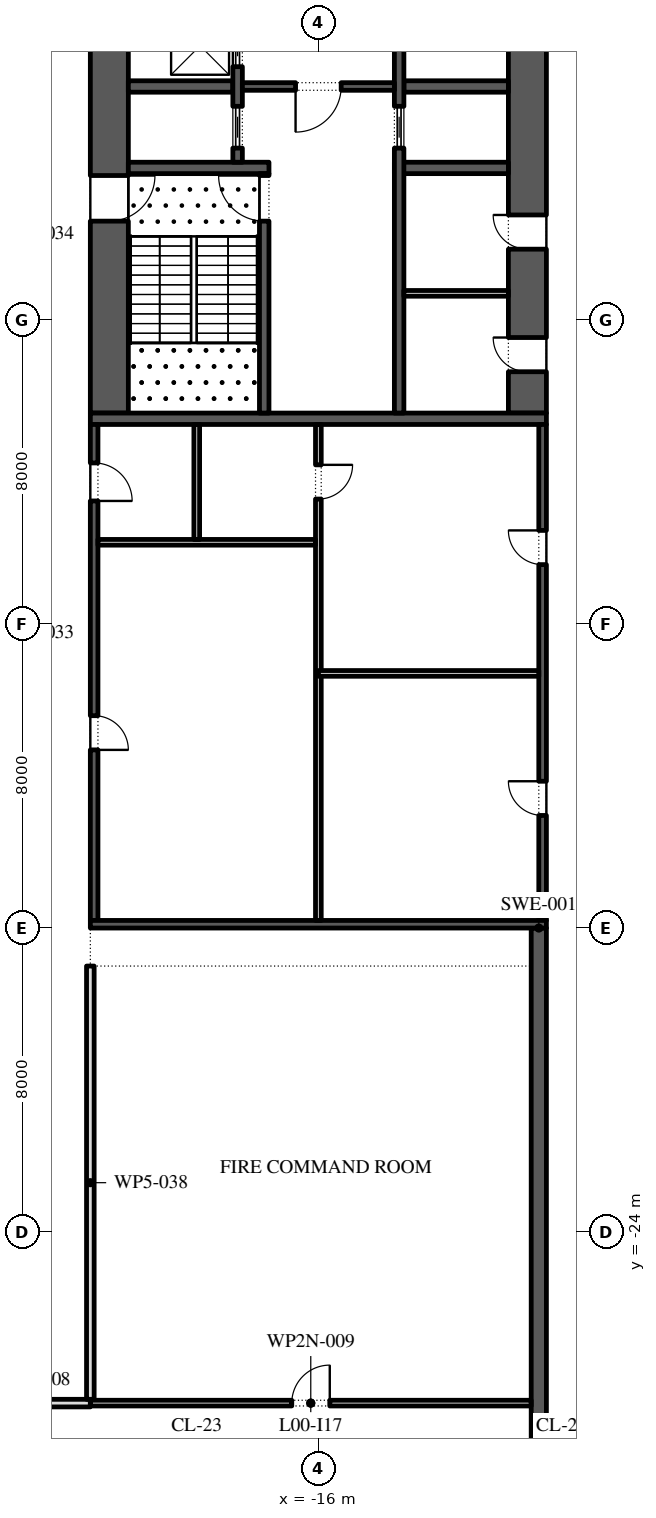
"""IFC4 building model, lengths in metres.
Left out: names, types, materials, properties, quantities, classifications, styles, units other than length and angle.
Written with IfcOpenShell. Run it as: python <this file> out.ifc"""

import sys

from ifc_helpers import new_model, si_unit, direction, frame, frame_2d, origin, place, context, subcontext, project, spatial, rectangle, extrude, element, fill, save


model = new_model("IFC4")
c1 = context("Model", 3, precision=1e-05, world=origin(), true_north=direction((0.0, 1.0)))
c2 = subcontext(c1, "Body", "Model", "MODEL_VIEW")
j1 = project(units=[si_unit("LENGTHUNIT", "METRE"), si_unit("PLANEANGLEUNIT", "RADIAN")], contexts=[c1])
p1 = place(None, origin())
s1 = spatial("IfcSite", under=j1, at=p1, CompositionType="ELEMENT")
p2 = place(p1, origin())
s2 = spatial("IfcBuilding", under=s1, at=p2, CompositionType="ELEMENT")
p3 = place(p2, origin())
s3 = spatial("IfcBuildingStorey", under=s2, at=p3, CompositionType="ELEMENT", Elevation=0.0)
p4 = place(p3, frame((-10.2, -31.0, 0.0), z_axis=(0.0, 0.0, 1.0), x_axis=(0.0, 1.0, 0.0)))
e1 = element("IfcWall", 1, at=p4, inside=s3, PredefinedType="SHEAR", context=c2, shape_type="SweptSolid", body=[
    extrude(rectangle(XDim=15.0, YDim=0.4, at=frame_2d((7.5, 0.0))), origin(), (0.0, 0.0, 1.0), 7.7),
])
p5 = place(p3, frame((-21.5, -2.45, 0.0), z_axis=(0.0, 0.0, 1.0), x_axis=(0.0, 1.0, 0.0)))
e2 = element("IfcWall", 2, at=p5, inside=s3, PredefinedType="SHEAR", context=c2, shape_type="SweptSolid", body=[
    extrude(rectangle(XDim=27.9, YDim=1.0, at=frame_2d((13.95, 0.0))), origin(), (0.0, 0.0, 1.0), 7.7),
])
p6 = place(p5, frame((5.05, 0.0, 0.0)))
e3 = element("IfcOpeningElement", 3, at=p6, cuts=e2, PredefinedType="OPENING", context=c2, shape_type="SweptSolid", body=[
    extrude(rectangle(XDim=1.2, YDim=2.1, at=frame_2d((0.6, 1.05))), frame((0.0, 0.51, 0.0), z_axis=(0.0, -1.0, 0.0), x_axis=(1.0, 0.0, 0.0)), (0.0, 0.0, 1.0), 1.02),
])
p7 = place(p5, frame((21.65, 0.0, 0.0)))
e4 = element("IfcOpeningElement", 4, at=p7, cuts=e2, PredefinedType="OPENING", context=c2, shape_type="SweptSolid", body=[
    extrude(rectangle(XDim=1.2, YDim=2.1, at=frame_2d((0.6, 1.05))), frame((0.0, 0.51, 0.0), z_axis=(0.0, -1.0, 0.0), x_axis=(1.0, 0.0, 0.0)), (0.0, 0.0, 1.0), 1.02),
])
p8 = place(p3, frame((-10.5, -2.45, 0.0), z_axis=(0.0, 0.0, 1.0), x_axis=(0.0, 1.0, 0.0)))
e5 = element("IfcWall", 5, at=p8, inside=s3, PredefinedType="SHEAR", context=c2, shape_type="SweptSolid", body=[
    extrude(rectangle(XDim=27.9, YDim=1.0, at=frame_2d((13.95, 0.0))), origin(), (0.0, 0.0, 1.0), 7.7),
])
p9 = place(p8, frame((23.65, 0.0, 0.0)))
e6 = element("IfcOpeningElement", 6, at=p9, cuts=e5, PredefinedType="OPENING", context=c2, shape_type="SweptSolid", body=[
    extrude(rectangle(XDim=2.4, YDim=2.1, at=frame_2d((1.2, 1.05))), frame((0.0, 0.51, 0.0), z_axis=(0.0, -1.0, 0.0), x_axis=(1.0, 0.0, 0.0)), (0.0, 0.0, 1.0), 1.02),
])
p10 = place(p8, frame((1.087, 0.0, 0.0)))
e7 = element("IfcOpeningElement", 7, at=p10, cuts=e5, PredefinedType="OPENING", context=c2, shape_type="SweptSolid", body=[
    extrude(rectangle(XDim=0.9, YDim=2.1, at=frame_2d((0.45, 1.05))), frame((0.0, 0.51, 0.0), z_axis=(0.0, -1.0, 0.0), x_axis=(1.0, 0.0, 0.0)), (0.0, 0.0, 1.0), 1.02),
])
p11 = place(p8, frame((4.312, 0.0, 0.0)))
e8 = element("IfcOpeningElement", 8, at=p11, cuts=e5, PredefinedType="OPENING", context=c2, shape_type="SweptSolid", body=[
    extrude(rectangle(XDim=0.9, YDim=2.1, at=frame_2d((0.45, 1.05))), frame((0.0, 0.51, 0.0), z_axis=(0.0, -1.0, 0.0), x_axis=(1.0, 0.0, 0.0)), (0.0, 0.0, 1.0), 1.02),
])
p12 = place(p3, frame((-22.0, -2.6, 0.0), z_axis=(0.0, 0.0, 1.0), x_axis=(1.0, 0.0, 0.0)))
e9 = element("IfcWall", 9, at=p12, inside=s3, PredefinedType="SHEAR", context=c2, shape_type="SweptSolid", body=[
    extrude(rectangle(XDim=12.0, YDim=0.3, at=frame_2d((6.0, 0.0))), origin(), (0.0, 0.0, 1.0), 7.7),
])
p13 = place(p3, frame((-21.0, 4.0, 0.0), z_axis=(0.0, 0.0, 1.0), x_axis=(1.0, 0.0, 0.0)))
e10 = element("IfcWall", 10, at=p13, inside=s3, PredefinedType="SHEAR", context=c2, shape_type="SweptSolid", body=[
    extrude(rectangle(XDim=3.7, YDim=0.3, at=frame_2d((1.85, 0.0))), origin(), (0.0, 0.0, 1.0), 7.7),
])
p14 = place(p3, frame((-17.425, -2.45, 0.0), z_axis=(0.0, 0.0, 1.0), x_axis=(0.0, 1.0, 0.0)))
e11 = element("IfcWall", 11, at=p14, inside=s3, PredefinedType="SHEAR", context=c2, shape_type="SweptSolid", body=[
    extrude(rectangle(XDim=6.3, YDim=0.25, at=frame_2d((3.15, 0.0))), origin(), (0.0, 0.0, 1.0), 7.7),
])
p15 = place(p14, frame((5.05, 0.0, 0.0)))
e12 = element("IfcOpeningElement", 12, at=p15, cuts=e11, PredefinedType="OPENING", context=c2, shape_type="SweptSolid", body=[
    extrude(rectangle(XDim=1.2, YDim=2.1, at=frame_2d((0.6, 1.05))), frame((0.0, 0.135, 0.0), z_axis=(0.0, -1.0, 0.0), x_axis=(1.0, 0.0, 0.0)), (0.0, 0.0, 1.0), 0.27),
])
p16 = place(p3, frame((-21.0, 6.143, 0.0), z_axis=(0.0, 0.0, 1.0), x_axis=(1.0, 0.0, 0.0)))
e13 = element("IfcWall", 13, at=p16, inside=s3, PredefinedType="SHEAR", context=c2, shape_type="SweptSolid", body=[
    extrude(rectangle(XDim=2.75, YDim=0.3, at=frame_2d((1.375, 0.0))), origin(), (0.0, 0.0, 1.0), 7.7),
])
p17 = place(p3, frame((-18.125, 4.15, 0.0), z_axis=(0.0, 0.0, 1.0), x_axis=(0.0, 1.0, 0.0)))
e14 = element("IfcWall", 14, at=p17, inside=s3, PredefinedType="SHEAR", context=c2, shape_type="SweptSolid", body=[
    extrude(rectangle(XDim=14.7, YDim=0.25, at=frame_2d((7.35, 0.0))), origin(), (0.0, 0.0, 1.0), 7.7),
])
p18 = place(p17, frame((0.371, 0.0, 0.0)))
e15 = element("IfcOpeningElement", 15, at=p18, cuts=e14, PredefinedType="OPENING", context=c2, shape_type="SweptSolid", body=[
    extrude(rectangle(XDim=1.1, YDim=2.1, at=frame_2d((0.55, 1.05))), frame((0.0, 0.135, 0.0), z_axis=(0.0, -1.0, 0.0), x_axis=(1.0, 0.0, 0.0)), (0.0, 0.0, 1.0), 0.27),
])
p19 = place(p17, frame((2.514, 0.0, 0.0)))
e16 = element("IfcOpeningElement", 16, at=p19, cuts=e14, PredefinedType="OPENING", context=c2, shape_type="SweptSolid", body=[
    extrude(rectangle(XDim=1.1, YDim=2.1, at=frame_2d((0.55, 1.05))), frame((0.0, 0.135, 0.0), z_axis=(0.0, -1.0, 0.0), x_axis=(1.0, 0.0, 0.0)), (0.0, 0.0, 1.0), 0.27),
])
p20 = place(p17, frame((4.657, 0.0, 0.0)))
e17 = element("IfcOpeningElement", 17, at=p20, cuts=e14, PredefinedType="OPENING", context=c2, shape_type="SweptSolid", body=[
    extrude(rectangle(XDim=1.1, YDim=2.1, at=frame_2d((0.55, 1.05))), frame((0.0, 0.135, 0.0), z_axis=(0.0, -1.0, 0.0), x_axis=(1.0, 0.0, 0.0)), (0.0, 0.0, 1.0), 0.27),
])
p21 = place(p17, frame((6.8, 0.0, 0.0)))
e18 = element("IfcOpeningElement", 18, at=p21, cuts=e14, PredefinedType="OPENING", context=c2, shape_type="SweptSolid", body=[
    extrude(rectangle(XDim=1.1, YDim=2.1, at=frame_2d((0.55, 1.05))), frame((0.0, 0.135, 0.0), z_axis=(0.0, -1.0, 0.0), x_axis=(1.0, 0.0, 0.0)), (0.0, 0.0, 1.0), 0.27),
])
p22 = place(p17, frame((8.943, 0.0, 0.0)))
e19 = element("IfcOpeningElement", 19, at=p22, cuts=e14, PredefinedType="OPENING", context=c2, shape_type="SweptSolid", body=[
    extrude(rectangle(XDim=1.1, YDim=2.1, at=frame_2d((0.55, 1.05))), frame((0.0, 0.135, 0.0), z_axis=(0.0, -1.0, 0.0), x_axis=(1.0, 0.0, 0.0)), (0.0, 0.0, 1.0), 0.27),
])
p23 = place(p17, frame((11.086, 0.0, 0.0)))
e20 = element("IfcOpeningElement", 20, at=p23, cuts=e14, PredefinedType="OPENING", context=c2, shape_type="SweptSolid", body=[
    extrude(rectangle(XDim=1.1, YDim=2.1, at=frame_2d((0.55, 1.05))), frame((0.0, 0.135, 0.0), z_axis=(0.0, -1.0, 0.0), x_axis=(1.0, 0.0, 0.0)), (0.0, 0.0, 1.0), 0.27),
])
p24 = place(p17, frame((13.229, 0.0, 0.0)))
e21 = element("IfcOpeningElement", 21, at=p24, cuts=e14, PredefinedType="OPENING", context=c2, shape_type="SweptSolid", body=[
    extrude(rectangle(XDim=1.1, YDim=2.1, at=frame_2d((0.55, 1.05))), frame((0.0, 0.135, 0.0), z_axis=(0.0, -1.0, 0.0), x_axis=(1.0, 0.0, 0.0)), (0.0, 0.0, 1.0), 0.27),
])
p25 = place(p3, frame((-14.0, 4.0, 0.0), z_axis=(0.0, 0.0, 1.0), x_axis=(1.0, 0.0, 0.0)))
e22 = element("IfcWall", 22, at=p25, inside=s3, PredefinedType="SHEAR", context=c2, shape_type="SweptSolid", body=[
    extrude(rectangle(XDim=3.0, YDim=0.3, at=frame_2d((1.5, 0.0))), origin(), (0.0, 0.0, 1.0), 7.7),
])
p26 = place(p3, frame((-13.75, 6.143, 0.0), z_axis=(0.0, 0.0, 1.0), x_axis=(1.0, 0.0, 0.0)))
e23 = element("IfcWall", 23, at=p26, inside=s3, PredefinedType="SHEAR", context=c2, shape_type="SweptSolid", body=[
    extrude(rectangle(XDim=2.75, YDim=0.3, at=frame_2d((1.375, 0.0))), origin(), (0.0, 0.0, 1.0), 7.7),
])
p27 = place(p3, frame((-13.875, -2.45, 0.0), z_axis=(0.0, 0.0, 1.0), x_axis=(0.0, 1.0, 0.0)))
e24 = element("IfcWall", 24, at=p27, inside=s3, PredefinedType="SHEAR", context=c2, shape_type="SweptSolid", body=[
    extrude(rectangle(XDim=21.3, YDim=0.25, at=frame_2d((10.65, 0.0))), origin(), (0.0, 0.0, 1.0), 7.7),
])
p28 = place(p27, frame((14.571, 0.0, 0.0)))
e25 = element("IfcOpeningElement", 25, at=p28, cuts=e24, PredefinedType="OPENING", context=c2, shape_type="SweptSolid", body=[
    extrude(rectangle(XDim=0.9, YDim=2.1, at=frame_2d((0.45, 1.05))), frame((0.0, 0.135, 0.0), z_axis=(0.0, -1.0, 0.0), x_axis=(1.0, 0.0, 0.0)), (0.0, 0.0, 1.0), 0.27),
])
p29 = place(p27, frame((6.971, 0.0, 0.0)))
e26 = element("IfcOpeningElement", 26, at=p29, cuts=e24, PredefinedType="OPENING", context=c2, shape_type="SweptSolid", body=[
    extrude(rectangle(XDim=1.1, YDim=2.1, at=frame_2d((0.55, 1.05))), frame((0.0, 0.135, 0.0), z_axis=(0.0, -1.0, 0.0), x_axis=(1.0, 0.0, 0.0)), (0.0, 0.0, 1.0), 0.27),
])
p30 = place(p3, frame((-18.0, 6.143, 0.0), z_axis=(0.0, 0.0, 1.0), x_axis=(1.0, 0.0, 0.0)))
e27 = element("IfcWall", 27, at=p30, inside=s3, PredefinedType="SHEAR", context=c2, shape_type="SweptSolid", body=[
    extrude(rectangle(XDim=4.0, YDim=0.2, at=frame_2d((2.0, 0.0))), origin(), (0.0, 0.0, 1.0), 7.7),
])
p31 = place(p30, frame((1.4, 0.0, 0.0)))
e28 = element("IfcOpeningElement", 28, at=p31, cuts=e27, PredefinedType="OPENING", context=c2, shape_type="SweptSolid", body=[
    extrude(rectangle(XDim=1.2, YDim=2.1, at=frame_2d((0.6, 1.05))), frame((0.0, 0.11, 0.0), z_axis=(0.0, -1.0, 0.0), x_axis=(1.0, 0.0, 0.0)), (0.0, 0.0, 1.0), 0.22),
])
p32 = place(p3, frame((-13.75, 0.7, 0.0), z_axis=(0.0, 0.0, 1.0), x_axis=(1.0, 0.0, 0.0)))
e29 = element("IfcWall", 29, at=p32, inside=s3, PredefinedType="PARTITIONING", context=c2, shape_type="SweptSolid", body=[
    extrude(rectangle(XDim=2.75, YDim=0.15, at=frame_2d((1.375, 0.0))), origin(), (0.0, 0.0, 1.0), 7.7),
])
p33 = place(p3, frame((-21.9, -15.8, 0.0), z_axis=(0.0, 0.0, 1.0), x_axis=(0.0, 1.0, 0.0)))
e30 = element("IfcWall", 30, at=p33, inside=s3, PredefinedType="SHEAR", context=c2, shape_type="SweptSolid", body=[
    extrude(rectangle(XDim=13.05, YDim=0.2, at=frame_2d((6.525, 0.0))), origin(), (0.0, 0.0, 1.0), 7.7),
])
p34 = place(p33, frame((4.488, 0.0, 0.0)))
e31 = element("IfcOpeningElement", 31, at=p34, cuts=e30, PredefinedType="OPENING", context=c2, shape_type="SweptSolid", body=[
    extrude(rectangle(XDim=0.9, YDim=2.1, at=frame_2d((0.45, 1.05))), frame((0.0, 0.11, 0.0), z_axis=(0.0, -1.0, 0.0), x_axis=(1.0, 0.0, 0.0)), (0.0, 0.0, 1.0), 0.22),
])
p35 = place(p33, frame((11.038, 0.0, 0.0)))
e32 = element("IfcOpeningElement", 32, at=p35, cuts=e30, PredefinedType="OPENING", context=c2, shape_type="SweptSolid", body=[
    extrude(rectangle(XDim=1.0, YDim=2.1, at=frame_2d((0.5, 1.05))), frame((0.0, 0.11, 0.0), z_axis=(0.0, -1.0, 0.0), x_axis=(1.0, 0.0, 0.0)), (0.0, 0.0, 1.0), 0.22),
])
p36 = place(p3, frame((-10.1, -15.8, 0.0), z_axis=(0.0, 0.0, 1.0), x_axis=(0.0, 1.0, 0.0)))
e33 = element("IfcWall", 33, at=p36, inside=s3, PredefinedType="SHEAR", context=c2, shape_type="SweptSolid", body=[
    extrude(rectangle(XDim=13.05, YDim=0.2, at=frame_2d((6.525, 0.0))), origin(), (0.0, 0.0, 1.0), 7.7),
])
p37 = place(p36, frame((2.762, 0.0, 0.0)))
e34 = element("IfcOpeningElement", 34, at=p37, cuts=e33, PredefinedType="OPENING", context=c2, shape_type="SweptSolid", body=[
    extrude(rectangle(XDim=0.9, YDim=2.1, at=frame_2d((0.45, 1.05))), frame((0.0, 0.11, 0.0), z_axis=(0.0, -1.0, 0.0), x_axis=(1.0, 0.0, 0.0)), (0.0, 0.0, 1.0), 0.22),
])
p38 = place(p36, frame((9.363, 0.0, 0.0)))
e35 = element("IfcOpeningElement", 35, at=p38, cuts=e33, PredefinedType="OPENING", context=c2, shape_type="SweptSolid", body=[
    extrude(rectangle(XDim=0.9, YDim=2.1, at=frame_2d((0.45, 1.05))), frame((0.0, 0.11, 0.0), z_axis=(0.0, -1.0, 0.0), x_axis=(1.0, 0.0, 0.0)), (0.0, 0.0, 1.0), 0.22),
])
p39 = place(p3, frame((-22.0, -15.9, 0.0), z_axis=(0.0, 0.0, 1.0), x_axis=(1.0, 0.0, 0.0)))
e36 = element("IfcWall", 36, at=p39, inside=s3, PredefinedType="SHEAR", context=c2, shape_type="SweptSolid", body=[
    extrude(rectangle(XDim=12.0, YDim=0.2, at=frame_2d((6.0, 0.0))), origin(), (0.0, 0.0, 1.0), 7.7),
])
p40 = place(p3, frame((-16.0, -15.8, 0.0), z_axis=(0.0, 0.0, 1.0), x_axis=(0.0, 1.0, 0.0)))
e37 = element("IfcWall", 37, at=p40, inside=s3, PredefinedType="PARTITIONING", context=c2, shape_type="SweptSolid", body=[
    extrude(rectangle(XDim=13.05, YDim=0.15, at=frame_2d((6.525, 0.0))), origin(), (0.0, 0.0, 1.0), 7.7),
])
p41 = place(p40, frame((11.087, 0.0, 0.0)))
e38 = element("IfcOpeningElement", 38, at=p41, cuts=e37, PredefinedType="OPENING", context=c2, shape_type="SweptSolid", body=[
    extrude(rectangle(XDim=0.9, YDim=2.1, at=frame_2d((0.45, 1.05))), frame((0.0, 0.085, 0.0), z_axis=(0.0, -1.0, 0.0), x_axis=(1.0, 0.0, 0.0)), (0.0, 0.0, 1.0), 0.17),
])
p42 = place(p3, frame((-16.0, -9.3, 0.0), z_axis=(0.0, 0.0, 1.0), x_axis=(1.0, 0.0, 0.0)))
e39 = element("IfcWall", 39, at=p42, inside=s3, PredefinedType="PARTITIONING", context=c2, shape_type="SweptSolid", body=[
    extrude(rectangle(XDim=5.8, YDim=0.15, at=frame_2d((2.9, 0.0))), origin(), (0.0, 0.0, 1.0), 7.7),
])
p43 = place(p3, frame((-21.8, -5.85, 0.0), z_axis=(0.0, 0.0, 1.0), x_axis=(1.0, 0.0, 0.0)))
e40 = element("IfcWall", 40, at=p43, inside=s3, PredefinedType="PARTITIONING", context=c2, shape_type="SweptSolid", body=[
    extrude(rectangle(XDim=5.725, YDim=0.15, at=frame_2d((2.863, 0.0))), origin(), (0.0, 0.0, 1.0), 7.7),
])
p44 = place(p3, frame((-19.2, -5.775, 0.0), z_axis=(0.0, 0.0, 1.0), x_axis=(0.0, 1.0, 0.0)))
e41 = element("IfcWall", 41, at=p44, inside=s3, PredefinedType="PARTITIONING", context=c2, shape_type="SweptSolid", body=[
    extrude(rectangle(XDim=3.025, YDim=0.15, at=frame_2d((1.512, 0.0))), origin(), (0.0, 0.0, 1.0), 7.7),
])
p45 = place(p3, frame((-25.0, -28.5, 0.0), z_axis=(0.0, 0.0, 1.0), x_axis=(1.0, 0.0, 0.0)))
e42 = element("IfcWall", 42, at=p45, inside=s3, PredefinedType="PARTITIONING", context=c2, shape_type="SweptSolid", body=[
    extrude(rectangle(XDim=3.0, YDim=0.2, at=frame_2d((1.5, 0.0))), origin(), (0.0, 0.0, 1.0), 7.7),
])
p46 = place(p3, frame((-22.0, -28.5, 0.0), z_axis=(0.0, 0.0, 1.0), x_axis=(1.0, 0.0, 0.0)))
e43 = element("IfcWall", 43, at=p46, inside=s3, PredefinedType="PARTITIONING", context=c2, shape_type="SweptSolid", body=[
    extrude(rectangle(XDim=11.6, YDim=0.15, at=frame_2d((5.8, 0.0))), origin(), (0.0, 0.0, 1.0), 7.7),
])
p47 = place(p46, frame((5.3, 0.0, 0.0)))
e44 = element("IfcOpeningElement", 44, at=p47, cuts=e43, PredefinedType="OPENING", context=c2, shape_type="SweptSolid", body=[
    extrude(rectangle(XDim=1.0, YDim=2.1, at=frame_2d((0.5, 1.05))), frame((0.0, 0.085, 0.0), z_axis=(0.0, -1.0, 0.0), x_axis=(1.0, 0.0, 0.0)), (0.0, 0.0, 1.0), 0.17),
])
p48 = place(p3, frame((-22.0, -28.4, 0.0), z_axis=(0.0, 0.0, 1.0), x_axis=(0.0, 1.0, 0.0)))
e45 = element("IfcWall", 45, at=p48, inside=s3, PredefinedType="PARTITIONING", context=c2, shape_type="SweptSolid", body=[
    extrude(rectangle(XDim=11.4, YDim=0.2, at=frame_2d((5.7, 0.0))), origin(), (0.0, 0.0, 1.0), 7.7),
])
p49 = place(p18, origin())
e46 = element("IfcDoor", 46, at=p49, inside=s3, OperationType="SLIDING_TO_LEFT", PredefinedType="DOOR", context=c2, shape_type="SweptSolid", body=[
    extrude(rectangle(XDim=1.1, YDim=2.1, at=frame_2d((0.55, 1.05))), frame((0.0, 0.025, 0.0), z_axis=(0.0, -1.0, 0.0), x_axis=(1.0, 0.0, 0.0)), (0.0, 0.0, 1.0), 0.05),
])
fill(e15, e46)
p50 = place(p19, origin())
e47 = element("IfcDoor", 47, at=p50, inside=s3, OperationType="SLIDING_TO_LEFT", PredefinedType="DOOR", context=c2, shape_type="SweptSolid", body=[
    extrude(rectangle(XDim=1.1, YDim=2.1, at=frame_2d((0.55, 1.05))), frame((0.0, 0.025, 0.0), z_axis=(0.0, -1.0, 0.0), x_axis=(1.0, 0.0, 0.0)), (0.0, 0.0, 1.0), 0.05),
])
fill(e16, e47)
p51 = place(p29, origin())
e48 = element("IfcDoor", 48, at=p51, inside=s3, OperationType="SLIDING_TO_LEFT", PredefinedType="DOOR", context=c2, shape_type="SweptSolid", body=[
    extrude(rectangle(XDim=1.1, YDim=2.1, at=frame_2d((0.55, 1.05))), frame((0.0, 0.025, 0.0), z_axis=(0.0, -1.0, 0.0), x_axis=(1.0, 0.0, 0.0)), (0.0, 0.0, 1.0), 0.05),
])
fill(e26, e48)
p52 = place(p31, frame((1.2, 0.0, 0.0), z_axis=(0.0, 0.0, 1.0), x_axis=(-1.0, 0.0, 0.0)))
e49 = element("IfcDoor", 49, at=p52, inside=s3, OperationType="SINGLE_SWING_LEFT", PredefinedType="DOOR", context=c2, shape_type="SweptSolid", body=[
    extrude(rectangle(XDim=1.2, YDim=2.1, at=frame_2d((0.6, 1.05))), frame((0.0, 0.025, 0.0), z_axis=(0.0, -1.0, 0.0), x_axis=(1.0, 0.0, 0.0)), (0.0, 0.0, 1.0), 0.05),
])
fill(e28, e49)
p53 = place(p15, origin())
e50 = element("IfcDoor", 50, at=p53, inside=s3, OperationType="SINGLE_SWING_LEFT", PredefinedType="DOOR", context=c2, shape_type="SweptSolid", body=[
    extrude(rectangle(XDim=1.2, YDim=2.1, at=frame_2d((0.6, 1.05))), frame((0.0, 0.025, 0.0), z_axis=(0.0, -1.0, 0.0), x_axis=(1.0, 0.0, 0.0)), (0.0, 0.0, 1.0), 0.05),
])
fill(e12, e50)
p54 = place(p6, frame((1.2, 0.0, 0.0), z_axis=(0.0, 0.0, 1.0), x_axis=(-1.0, 0.0, 0.0)))
e51 = element("IfcDoor", 51, at=p54, inside=s3, OperationType="SINGLE_SWING_RIGHT", PredefinedType="DOOR", context=c2, shape_type="SweptSolid", body=[
    extrude(rectangle(XDim=1.2, YDim=2.1, at=frame_2d((0.6, 1.05))), frame((0.0, 0.025, 0.0), z_axis=(0.0, -1.0, 0.0), x_axis=(1.0, 0.0, 0.0)), (0.0, 0.0, 1.0), 0.05),
])
fill(e3, e51)
p55 = place(p10, origin())
e52 = element("IfcDoor", 52, at=p55, inside=s3, OperationType="SINGLE_SWING_LEFT", PredefinedType="DOOR", context=c2, shape_type="SweptSolid", body=[
    extrude(rectangle(XDim=0.9, YDim=2.1, at=frame_2d((0.45, 1.05))), frame((0.0, 0.5, 0.0), z_axis=(0.0, -1.0, 0.0), x_axis=(1.0, 0.0, 0.0)), (0.0, 0.0, 1.0), 0.05),
])
fill(e7, e52)
p56 = place(p11, origin())
e53 = element("IfcDoor", 53, at=p56, inside=s3, OperationType="SINGLE_SWING_LEFT", PredefinedType="DOOR", context=c2, shape_type="SweptSolid", body=[
    extrude(rectangle(XDim=0.9, YDim=2.1, at=frame_2d((0.45, 1.05))), frame((0.0, 0.5, 0.0), z_axis=(0.0, -1.0, 0.0), x_axis=(1.0, 0.0, 0.0)), (0.0, 0.0, 1.0), 0.05),
])
fill(e8, e53)
p57 = place(p34, frame((0.9, -0.15, 0.0), z_axis=(0.0, 0.0, 1.0), x_axis=(-1.0, 0.0, 0.0)))
e54 = element("IfcDoor", 54, at=p57, inside=s3, OperationType="SINGLE_SWING_LEFT", PredefinedType="DOOR", context=c2, shape_type="SweptSolid", body=[
    extrude(rectangle(XDim=0.9, YDim=2.1, at=frame_2d((0.45, 1.05))), frame((0.0, -0.05, 0.0), z_axis=(0.0, -1.0, 0.0), x_axis=(1.0, 0.0, 0.0)), (0.0, 0.0, 1.0), 0.05),
])
fill(e31, e54)
p58 = place(p35, frame((1.0, -0.15, 0.0), z_axis=(0.0, 0.0, 1.0), x_axis=(-1.0, 0.0, 0.0)))
e55 = element("IfcDoor", 55, at=p58, inside=s3, OperationType="SINGLE_SWING_LEFT", PredefinedType="DOOR", context=c2, shape_type="SweptSolid", body=[
    extrude(rectangle(XDim=1.0, YDim=2.1, at=frame_2d((0.5, 1.05))), frame((0.0, -0.05, 0.0), z_axis=(0.0, -1.0, 0.0), x_axis=(1.0, 0.0, 0.0)), (0.0, 0.0, 1.0), 0.05),
])
fill(e32, e55)
p59 = place(p41, frame((0.9, 0.0, 0.0), z_axis=(0.0, 0.0, 1.0), x_axis=(-1.0, 0.0, 0.0)))
e56 = element("IfcDoor", 56, at=p59, inside=s3, OperationType="SINGLE_SWING_RIGHT", PredefinedType="DOOR", context=c2, shape_type="SweptSolid", body=[
    extrude(rectangle(XDim=0.9, YDim=2.1, at=frame_2d((0.45, 1.05))), frame((0.0, 0.025, 0.0), z_axis=(0.0, -1.0, 0.0), x_axis=(1.0, 0.0, 0.0)), (0.0, 0.0, 1.0), 0.05),
])
fill(e38, e56)
p60 = place(p37, origin())
e57 = element("IfcDoor", 57, at=p60, inside=s3, OperationType="SINGLE_SWING_LEFT", PredefinedType="DOOR", context=c2, shape_type="SweptSolid", body=[
    extrude(rectangle(XDim=0.9, YDim=2.1, at=frame_2d((0.45, 1.05))), frame((0.0, 0.1, 0.0), z_axis=(0.0, -1.0, 0.0), x_axis=(1.0, 0.0, 0.0)), (0.0, 0.0, 1.0), 0.05),
])
fill(e34, e57)
p61 = place(p38, origin())
e58 = element("IfcDoor", 58, at=p61, inside=s3, OperationType="SINGLE_SWING_LEFT", PredefinedType="DOOR", context=c2, shape_type="SweptSolid", body=[
    extrude(rectangle(XDim=0.9, YDim=2.1, at=frame_2d((0.45, 1.05))), frame((0.0, 0.1, 0.0), z_axis=(0.0, -1.0, 0.0), x_axis=(1.0, 0.0, 0.0)), (0.0, 0.0, 1.0), 0.05),
])
fill(e35, e58)
p62 = place(p47, origin())
e59 = element("IfcDoor", 59, at=p62, inside=s3, OperationType="SINGLE_SWING_LEFT", PredefinedType="DOOR", context=c2, shape_type="SweptSolid", body=[
    extrude(rectangle(XDim=1.0, YDim=2.1, at=frame_2d((0.5, 1.05))), frame((0.0, 0.025, 0.0), z_axis=(0.0, -1.0, 0.0), x_axis=(1.0, 0.0, 0.0)), (0.0, 0.0, 1.0), 0.05),
])
fill(e44, e59)
save(model, sys.argv[1])
